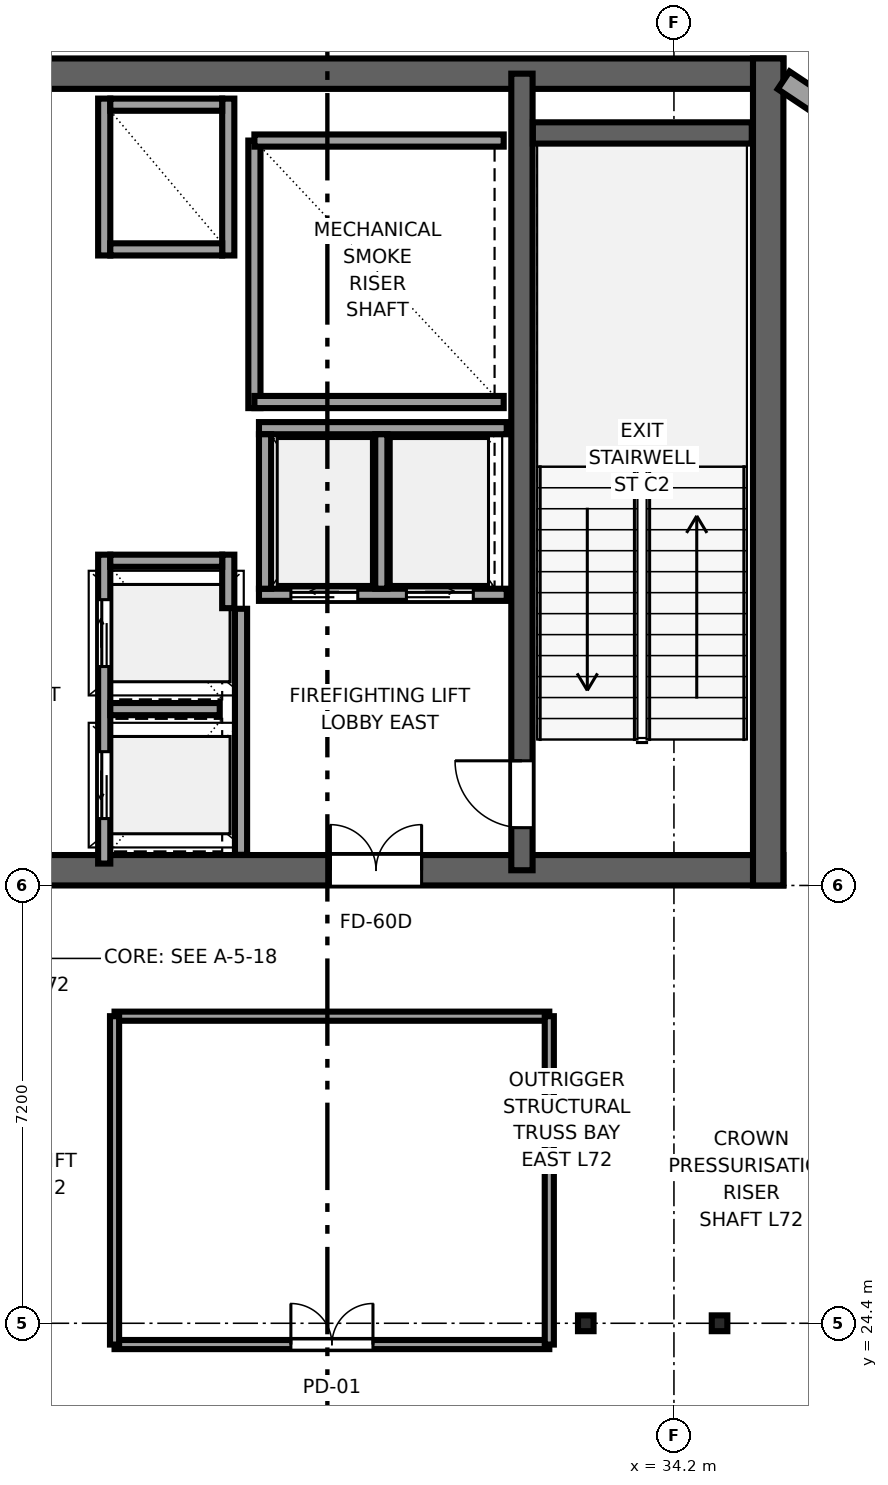
"""IFC4 building model, lengths in metres.
Left out: names, types, materials, properties, quantities, classifications, styles, units other than length and angle.
Written with IfcOpenShell. Run it as: python <this file> out.ifc"""

import sys

from ifc_helpers import new_model, si_unit, direction, frame, frame_2d, origin, origin_2d, place, context, subcontext, project, spatial, rectangle, i_section, extrude, source, transform, mapped, element, fill, save


model = new_model("IFC4")
c1 = context("Model", 3, precision=1e-05, world=origin(), true_north=direction((0.0, 1.0)))
c2 = subcontext(c1, "Body", "Model", "MODEL_VIEW")
j1 = project(units=[si_unit("LENGTHUNIT", "METRE"), si_unit("PLANEANGLEUNIT", "RADIAN")], contexts=[c1])
p1 = place(None, origin())
s1 = spatial("IfcSite", under=j1, at=p1, CompositionType="ELEMENT")
p2 = place(p1, origin())
s2 = spatial("IfcBuilding", under=s1, at=p2, CompositionType="ELEMENT")
p3 = place(p2, frame((0.0, 0.0, 270.05)))
s3 = spatial("IfcBuildingStorey", under=s2, at=p3, CompositionType="ELEMENT", Elevation=270.05)
p4 = place(p3, frame((10.0, 31.85, 0.0), z_axis=(0.0, 0.0, 1.0), x_axis=(1.0, 0.0, 0.0)))
e1 = element("IfcWall", 1, at=p4, inside=s3, PredefinedType="SHEAR", context=c2, shape_type="SweptSolid", body=[
    extrude(rectangle(XDim=26.0, YDim=0.5, at=frame_2d((13.0, 0.0))), origin(), (0.0, 0.0, 1.0), 5.0),
])
p5 = place(p4, frame((7.45, 0.0, 0.0), z_axis=(0.0, 0.0, 1.0), x_axis=(-1.0, 0.0, 0.0)))
e2 = element("IfcOpeningElement", 2, at=p5, cuts=e1, PredefinedType="OPENING", context=c2, shape_type="SweptSolid", body=[
    extrude(rectangle(XDim=1.5, YDim=2.04, at=frame_2d((0.75, 1.02))), frame((0.0, 0.26, 0.0), z_axis=(0.0, -1.0, 0.0), x_axis=(1.0, 0.0, 0.0)), (0.0, 0.0, 1.0), 0.52),
])
p6 = place(p4, frame((13.75, 0.0, 0.0), z_axis=(0.0, 0.0, 1.0), x_axis=(-1.0, 0.0, 0.0)))
e3 = element("IfcOpeningElement", 3, at=p6, cuts=e1, PredefinedType="OPENING", context=c2, shape_type="SweptSolid", body=[
    extrude(rectangle(XDim=1.5, YDim=2.04, at=frame_2d((0.75, 1.02))), frame((0.0, 0.26, 0.0), z_axis=(0.0, -1.0, 0.0), x_axis=(1.0, 0.0, 0.0)), (0.0, 0.0, 1.0), 0.52),
])
p7 = place(p4, frame((20.05, 0.0, 0.0), z_axis=(0.0, 0.0, 1.0), x_axis=(-1.0, 0.0, 0.0)))
e4 = element("IfcOpeningElement", 4, at=p7, cuts=e1, PredefinedType="OPENING", context=c2, shape_type="SweptSolid", body=[
    extrude(rectangle(XDim=1.5, YDim=2.04, at=frame_2d((0.75, 1.02))), frame((0.0, 0.26, 0.0), z_axis=(0.0, -1.0, 0.0), x_axis=(1.0, 0.0, 0.0)), (0.0, 0.0, 1.0), 0.52),
])
p8 = place(p3, frame((10.0, 44.95, 0.0), z_axis=(0.0, 0.0, 1.0), x_axis=(1.0, 0.0, 0.0)))
e5 = element("IfcWall", 5, at=p8, inside=s3, PredefinedType="SHEAR", context=c2, shape_type="SweptSolid", body=[
    extrude(rectangle(XDim=26.0, YDim=0.5, at=frame_2d((13.0, 0.0))), origin(), (0.0, 0.0, 1.0), 5.0),
])
p9 = place(p3, frame((35.75, 31.6, 0.0), z_axis=(0.0, 0.0, 1.0), x_axis=(0.0, 1.0, 0.0)))
e6 = element("IfcWall", 6, at=p9, inside=s3, PredefinedType="SHEAR", context=c2, shape_type="SweptSolid", body=[
    extrude(rectangle(XDim=13.6, YDim=0.5, at=frame_2d((6.8, 0.0))), origin(), (0.0, 0.0, 1.0), 5.0),
])
p10 = place(p3, frame((31.7, 31.85, 0.0), z_axis=(0.0, 0.0, 1.0), x_axis=(0.0, 1.0, 0.0)))
e7 = element("IfcWall", 7, at=p10, inside=s3, PredefinedType="SHEAR", context=c2, shape_type="SweptSolid", body=[
    extrude(rectangle(XDim=13.1, YDim=0.35, at=frame_2d((6.55, 0.0))), origin(), (0.0, 0.0, 1.0), 5.0),
])
p11 = place(p10, frame((1.8, 0.0, 0.0), z_axis=(0.0, 0.0, 1.0), x_axis=(-1.0, 0.0, 0.0)))
e8 = element("IfcOpeningElement", 8, at=p11, cuts=e7, PredefinedType="OPENING", context=c2, shape_type="SweptSolid", body=[
    extrude(rectangle(XDim=1.1, YDim=2.12, at=frame_2d((0.55, 1.06))), frame((0.0, 0.185, 0.0), z_axis=(0.0, -1.0, 0.0), x_axis=(1.0, 0.0, 0.0)), (0.0, 0.0, 1.0), 0.37),
])
p12 = place(p3, frame((31.88, 43.975, 0.0), z_axis=(0.0, 0.0, 1.0), x_axis=(1.0, 0.0, 0.0)))
e9 = element("IfcWall", 9, at=p12, inside=s3, PredefinedType="SHEAR", context=c2, shape_type="SweptSolid", body=[
    extrude(rectangle(XDim=3.6, YDim=0.35, at=frame_2d((1.8, 0.0))), origin(), (0.0, 0.0, 1.0), 5.0),
])
m1 = source(origin(), c2, "Body", "SweptSolid", [
    extrude(i_section(OverallWidth=0.256, OverallDepth=0.26, WebThickness=0.01, FlangeThickness=0.017, FilletRadius=0.014, at=origin_2d()), origin(), (0.0, 0.0, 1.0), 5.0),
])
for number, where, z_axis, x_axis in (
    (10, (32.75, 24.4, 0.0), (0.0, 0.0, 1.0), (1.0, 0.0, 0.0)),
    (11, (34.95, 24.4, 0.0), (0.0, 0.0, 1.0), (1.0, 0.0, 0.0)),
):
    element("IfcColumn", number, at=place(p3, frame(where, z_axis=z_axis, x_axis=x_axis)), inside=s3, PredefinedType="COLUMN", context=c2, shape_type="MappedRepresentation", body=[
        mapped(m1, transform((0.0, 0.0, 0.0), x_axis=(1.0, 0.0, 0.0), y_axis=(0.0, 1.0, 0.0), z_axis=(0.0, 0.0, 1.0), scale=1.0)),
    ])
p13 = place(p3, frame((37.585, 43.785, 0.0), z_axis=(0.0, 0.0, 1.0), x_axis=(-0.831516639465, 0.555499845448, 0.0)))
e12 = element("IfcWall", 12, at=p13, inside=s3, PredefinedType="SOLIDWALL", context=c2, shape_type="SweptSolid", body=[
    extrude(rectangle(XDim=1.902, YDim=0.35, at=frame_2d((0.951, 0.0))), origin(), (0.0, 0.0, 1.0), 4.78),
])
p14 = place(p3, frame((27.3, 39.45, 0.0), z_axis=(0.0, 0.0, 1.0), x_axis=(0.0, 1.0, 0.0)))
e13 = element("IfcWall", 13, at=p14, inside=s3, PredefinedType="SOLIDWALL", context=c2, shape_type="SweptSolid", body=[
    extrude(rectangle(XDim=4.4, YDim=0.2, at=frame_2d((2.2, 0.0))), origin(), (0.0, 0.0, 1.0), 4.78),
])
for number, where, z_axis, x_axis in (
    (14, (27.3, 39.55, 0.0), (0.0, 0.0, 1.0), (1.0, 0.0, 0.0)),
    (15, (27.3, 43.85, 0.0), (0.0, 0.0, 1.0), (1.0, 0.0, 0.0)),
):
    element("IfcWall", number, at=place(p3, frame(where, z_axis=z_axis, x_axis=x_axis)), inside=s3, PredefinedType="SOLIDWALL", context=c2, shape_type="SweptSolid", body=[
        extrude(rectangle(XDim=4.1, YDim=0.2, at=frame_2d((2.05, 0.0))), origin(), (0.0, 0.0, 1.0), 4.78),
    ])
p15 = place(p3, frame((27.08, 32.104, 0.0), z_axis=(0.0, 0.0, 1.0), x_axis=(0.0, 1.0, 0.0)))
e16 = element("IfcWall", 16, at=p15, inside=s3, PredefinedType="SOLIDWALL", context=c2, shape_type="SweptSolid", body=[
    extrude(rectangle(XDim=4.046, YDim=0.2, at=frame_2d((2.023, 0.0))), origin(), (0.0, 0.0, 1.0), 4.78),
])
p16 = place(p3, frame((27.375, 36.38, 0.0), z_axis=(0.0, 0.0, 1.0), x_axis=(1.0, 0.0, 0.0)))
e17 = element("IfcWall", 17, at=p16, inside=s3, PredefinedType="SOLIDWALL", context=c2, shape_type="SweptSolid", body=[
    extrude(rectangle(XDim=4.075, YDim=0.2, at=frame_2d((2.038, 0.0))), origin(), (0.0, 0.0, 1.0), 4.78),
])
p17 = place(p16, frame((0.525, 0.0, 0.0)))
e18 = element("IfcOpeningElement", 18, at=p17, cuts=e17, PredefinedType="OPENING", context=c2, shape_type="SweptSolid", body=[
    extrude(rectangle(XDim=1.1, YDim=2.12, at=frame_2d((0.55, 1.06))), frame((0.0, 0.11, 0.0), z_axis=(0.0, -1.0, 0.0), x_axis=(1.0, 0.0, 0.0)), (0.0, 0.0, 1.0), 0.22),
])
p18 = place(p16, frame((2.425, 0.0, 0.0)))
e19 = element("IfcOpeningElement", 19, at=p18, cuts=e17, PredefinedType="OPENING", context=c2, shape_type="SweptSolid", body=[
    extrude(rectangle(XDim=1.1, YDim=2.12, at=frame_2d((0.55, 1.06))), frame((0.0, 0.11, 0.0), z_axis=(0.0, -1.0, 0.0), x_axis=(1.0, 0.0, 0.0)), (0.0, 0.0, 1.0), 0.22),
])
p19 = place(p3, frame((27.375, 39.12, 0.0), z_axis=(0.0, 0.0, 1.0), x_axis=(1.0, 0.0, 0.0)))
e20 = element("IfcWall", 20, at=p19, inside=s3, PredefinedType="SOLIDWALL", context=c2, shape_type="SweptSolid", body=[
    extrude(rectangle(XDim=4.075, YDim=0.2, at=frame_2d((2.038, 0.0))), origin(), (0.0, 0.0, 1.0), 4.78),
])
for number, where, z_axis, x_axis in (
    (21, (27.475, 36.48, 0.0), (0.0, 0.0, 1.0), (0.0, 1.0, 0.0)),
    (22, (29.387, 36.48, 0.0), (0.0, 0.0, 1.0), (0.0, 1.0, 0.0)),
):
    element("IfcWall", number, at=place(p3, frame(where, z_axis=z_axis, x_axis=x_axis)), inside=s3, PredefinedType="SOLIDWALL", context=c2, shape_type="SweptSolid", body=[
        extrude(rectangle(XDim=2.54, YDim=0.2, at=frame_2d((1.27, 0.0))), origin(), (0.0, 0.0, 1.0), 4.78),
    ])
p20 = place(p3, frame((24.83, 31.96, 0.0), z_axis=(0.0, 0.0, 1.0), x_axis=(0.0, 1.0, 0.0)))
e23 = element("IfcWall", 23, at=p20, inside=s3, PredefinedType="SOLIDWALL", context=c2, shape_type="SweptSolid", body=[
    extrude(rectangle(XDim=5.08, YDim=0.2, at=frame_2d((2.54, 0.0))), origin(), (0.0, 0.0, 1.0), 4.78),
])
p21 = place(p20, frame((0.74, 0.0, 0.0)))
e24 = element("IfcOpeningElement", 24, at=p21, cuts=e23, PredefinedType="OPENING", context=c2, shape_type="SweptSolid", body=[
    extrude(rectangle(XDim=1.1, YDim=2.12, at=frame_2d((0.55, 1.06))), frame((0.0, 0.11, 0.0), z_axis=(0.0, -1.0, 0.0), x_axis=(1.0, 0.0, 0.0)), (0.0, 0.0, 1.0), 0.22),
])
p22 = place(p20, frame((3.24, 0.0, 0.0)))
e25 = element("IfcOpeningElement", 25, at=p22, cuts=e23, PredefinedType="OPENING", context=c2, shape_type="SweptSolid", body=[
    extrude(rectangle(XDim=1.1, YDim=2.12, at=frame_2d((0.55, 1.06))), frame((0.0, 0.11, 0.0), z_axis=(0.0, -1.0, 0.0), x_axis=(1.0, 0.0, 0.0)), (0.0, 0.0, 1.0), 0.22),
])
p23 = place(p3, frame((26.87, 36.16, 0.0), z_axis=(0.0, 0.0, 1.0), x_axis=(0.0, 1.0, 0.0)))
e26 = element("IfcWall", 26, at=p23, inside=s3, PredefinedType="SOLIDWALL", context=c2, shape_type="SweptSolid", body=[
    extrude(rectangle(XDim=0.88, YDim=0.2, at=frame_2d((0.44, 0.0))), origin(), (0.0, 0.0, 1.0), 4.78),
])
p24 = place(p3, frame((24.93, 36.94, 0.0), z_axis=(0.0, 0.0, 1.0), x_axis=(1.0, 0.0, 0.0)))
e27 = element("IfcWall", 27, at=p24, inside=s3, PredefinedType="SOLIDWALL", context=c2, shape_type="SweptSolid", body=[
    extrude(rectangle(XDim=1.84, YDim=0.2, at=frame_2d((0.92, 0.0))), origin(), (0.0, 0.0, 1.0), 4.78),
])
p25 = place(p3, frame((24.93, 34.5, 0.0), z_axis=(0.0, 0.0, 1.0), x_axis=(1.0, 0.0, 0.0)))
e28 = element("IfcWall", 28, at=p25, inside=s3, PredefinedType="SOLIDWALL", context=c2, shape_type="SweptSolid", body=[
    extrude(rectangle(XDim=1.8, YDim=0.2, at=frame_2d((0.9, 0.0))), origin(), (0.0, 0.0, 1.0), 4.78),
])
for number, where, z_axis, x_axis in (
    (29, (24.83, 41.96, 0.0), (0.0, 0.0, 1.0), (0.0, 1.0, 0.0)),
    (30, (26.87, 41.96, 0.0), (0.0, 0.0, 1.0), (0.0, 1.0, 0.0)),
):
    element("IfcWall", number, at=place(p3, frame(where, z_axis=z_axis, x_axis=x_axis)), inside=s3, PredefinedType="SOLIDWALL", context=c2, shape_type="SweptSolid", body=[
        extrude(rectangle(XDim=2.58, YDim=0.2, at=frame_2d((1.29, 0.0))), origin(), (0.0, 0.0, 1.0), 4.78),
    ])
for number, where, z_axis, x_axis in (
    (31, (24.93, 42.06, 0.0), (0.0, 0.0, 1.0), (1.0, 0.0, 0.0)),
    (32, (24.93, 44.44, 0.0), (0.0, 0.0, 1.0), (1.0, 0.0, 0.0)),
):
    element("IfcWall", number, at=place(p3, frame(where, z_axis=z_axis, x_axis=x_axis)), inside=s3, PredefinedType="SOLIDWALL", context=c2, shape_type="SweptSolid", body=[
        extrude(rectangle(XDim=1.84, YDim=0.2, at=frame_2d((0.92, 0.0))), origin(), (0.0, 0.0, 1.0), 4.78),
    ])
p26 = place(p3, frame((25.0, 24.05, 0.0), z_axis=(0.0, 0.0, 1.0), x_axis=(1.0, 0.0, 0.0)))
e33 = element("IfcWall", 33, at=p26, inside=s3, PredefinedType="PARTITIONING", context=c2, shape_type="SweptSolid", body=[
    extrude(rectangle(XDim=7.15, YDim=0.15, at=frame_2d((3.575, 0.0))), origin(), (0.0, 0.0, 1.0), 4.78),
])
p27 = place(p26, frame((2.9, 0.0, 0.0)))
e34 = element("IfcOpeningElement", 34, at=p27, cuts=e33, PredefinedType="OPENING", context=c2, shape_type="SweptSolid", body=[
    extrude(rectangle(XDim=1.35, YDim=2.15, at=frame_2d((0.675, 1.075))), frame((0.0, 0.085, 0.0), z_axis=(0.0, -1.0, 0.0), x_axis=(1.0, 0.0, 0.0)), (0.0, 0.0, 1.0), 0.17),
])
p28 = place(p3, frame((25.0, 29.45, 0.0), z_axis=(0.0, 0.0, 1.0), x_axis=(1.0, 0.0, 0.0)))
e35 = element("IfcWall", 35, at=p28, inside=s3, PredefinedType="PARTITIONING", context=c2, shape_type="SweptSolid", body=[
    extrude(rectangle(XDim=7.15, YDim=0.15, at=frame_2d((3.575, 0.0))), origin(), (0.0, 0.0, 1.0), 4.78),
])
for number, where, z_axis, x_axis in (
    (36, (25.0, 24.05, 0.0), (0.0, 0.0, 1.0), (0.0, 1.0, 0.0)),
    (37, (32.15, 24.05, 0.0), (0.0, 0.0, 1.0), (0.0, 1.0, 0.0)),
):
    element("IfcWall", number, at=place(p3, frame(where, z_axis=z_axis, x_axis=x_axis)), inside=s3, PredefinedType="PARTITIONING", context=c2, shape_type="SweptSolid", body=[
        extrude(rectangle(XDim=5.4, YDim=0.15, at=frame_2d((2.7, 0.0))), origin(), (0.0, 0.0, 1.0), 4.78),
    ])
m2 = source(origin(), c2, "Body", "SweptSolid", [
    extrude(rectangle(XDim=1.1, YDim=2.12, at=frame_2d((0.55, 1.06))), frame((0.0, 0.025, 0.0), z_axis=(0.0, -1.0, 0.0), x_axis=(1.0, 0.0, 0.0)), (0.0, 0.0, 1.0), 0.05),
])
p29 = place(p11, origin())
e38 = element("IfcDoor", 38, at=p29, inside=s3, OperationType="SINGLE_SWING_RIGHT", PredefinedType="DOOR", context=c2, shape_type="MappedRepresentation", body=[
    mapped(m2, transform((0.0, 0.0, 0.0), x_axis=(1.0, 0.0, 0.0), y_axis=(0.0, 1.0, 0.0), z_axis=(0.0, 0.0, 1.0), scale=1.0)),
])
fill(e8, e38)
m3 = source(origin(), c2, "Body", "SweptSolid", [
    extrude(rectangle(XDim=1.5, YDim=2.04, at=frame_2d((0.75, 1.02))), frame((0.0, 0.025, 0.0), z_axis=(0.0, -1.0, 0.0), x_axis=(1.0, 0.0, 0.0)), (0.0, 0.0, 1.0), 0.05),
])
p30 = place(p7, origin())
e39 = element("IfcDoor", 39, at=p30, inside=s3, OperationType="DOUBLE_DOOR_SINGLE_SWING", PredefinedType="DOOR", context=c2, shape_type="MappedRepresentation", body=[
    mapped(m3, transform((0.0, 0.0, 0.0), x_axis=(1.0, 0.0, 0.0), y_axis=(0.0, 1.0, 0.0), z_axis=(0.0, 0.0, 1.0), scale=1.0)),
])
fill(e4, e39)
m4 = source(origin(), c2, "Body", "SweptSolid", [
    extrude(rectangle(XDim=1.1, YDim=2.12, at=frame_2d((0.55, 1.06))), frame((0.0, 0.025, 0.0), z_axis=(0.0, -1.0, 0.0), x_axis=(1.0, 0.0, 0.0)), (0.0, 0.0, 1.0), 0.05),
])
p31 = place(p17, origin())
e40 = element("IfcDoor", 40, at=p31, inside=s3, OperationType="SLIDING_TO_LEFT", PredefinedType="DOOR", context=c2, shape_type="MappedRepresentation", body=[
    mapped(m4, transform((0.0, 0.0, 0.0), x_axis=(1.0, 0.0, 0.0), y_axis=(0.0, 1.0, 0.0), z_axis=(0.0, 0.0, 1.0), scale=1.0)),
])
fill(e18, e40)
p32 = place(p18, origin())
e41 = element("IfcDoor", 41, at=p32, inside=s3, OperationType="SLIDING_TO_RIGHT", PredefinedType="DOOR", context=c2, shape_type="MappedRepresentation", body=[
    mapped(m4, transform((0.0, 0.0, 0.0), x_axis=(1.0, 0.0, 0.0), y_axis=(0.0, 1.0, 0.0), z_axis=(0.0, 0.0, 1.0), scale=1.0)),
])
fill(e19, e41)
p33 = place(p21, origin())
e42 = element("IfcDoor", 42, at=p33, inside=s3, OperationType="SLIDING_TO_LEFT", PredefinedType="DOOR", context=c2, shape_type="MappedRepresentation", body=[
    mapped(m4, transform((0.0, 0.0, 0.0), x_axis=(1.0, 0.0, 0.0), y_axis=(0.0, 1.0, 0.0), z_axis=(0.0, 0.0, 1.0), scale=1.0)),
])
fill(e24, e42)
p34 = place(p22, origin())
e43 = element("IfcDoor", 43, at=p34, inside=s3, OperationType="SLIDING_TO_RIGHT", PredefinedType="DOOR", context=c2, shape_type="MappedRepresentation", body=[
    mapped(m4, transform((0.0, 0.0, 0.0), x_axis=(1.0, 0.0, 0.0), y_axis=(0.0, 1.0, 0.0), z_axis=(0.0, 0.0, 1.0), scale=1.0)),
])
fill(e25, e43)
m5 = source(origin(), c2, "Body", "SweptSolid", [
    extrude(rectangle(XDim=1.35, YDim=2.15, at=frame_2d((0.675, 1.075))), frame((0.0, 0.025, 0.0), z_axis=(0.0, -1.0, 0.0), x_axis=(1.0, 0.0, 0.0)), (0.0, 0.0, 1.0), 0.05),
])
p35 = place(p27, origin())
e44 = element("IfcDoor", 44, at=p35, inside=s3, OperationType="DOUBLE_DOOR_SINGLE_SWING", PredefinedType="DOOR", context=c2, shape_type="MappedRepresentation", body=[
    mapped(m5, transform((0.0, 0.0, 0.0), x_axis=(1.0, 0.0, 0.0), y_axis=(0.0, 1.0, 0.0), z_axis=(0.0, 0.0, 1.0), scale=1.0)),
])
fill(e34, e44)
save(model, sys.argv[1])
